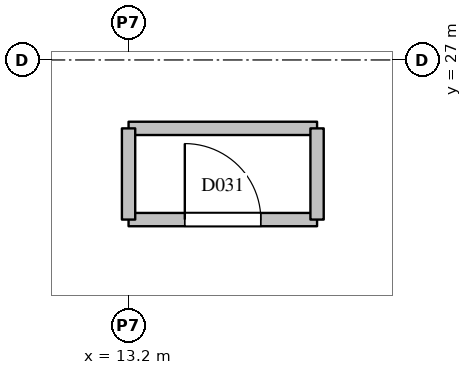
"""IFC4 building model, lengths in metres.
Left out: names, types, materials, properties, quantities, classifications, styles, units other than length and angle.
Written with IfcOpenShell. Run it as: python <this file> out.ifc"""

import sys

from ifc_helpers import new_model, si_unit, direction, frame, frame_2d, origin, place, context, subcontext, project, spatial, rectangle, extrude, element, fill, save


model = new_model("IFC4")
c1 = context("Model", 3, precision=1e-05, world=origin(), true_north=direction((0.0, 1.0)))
c2 = subcontext(c1, "Body", "Model", "MODEL_VIEW")
j1 = project(units=[si_unit("LENGTHUNIT", "METRE"), si_unit("PLANEANGLEUNIT", "RADIAN")], contexts=[c1])
p1 = place(None, origin())
s1 = spatial("IfcSite", under=j1, at=p1, CompositionType="ELEMENT")
p2 = place(p1, origin())
s2 = spatial("IfcBuilding", under=s1, at=p2, CompositionType="ELEMENT")
p3 = place(p2, frame((0.0, 0.0, 38.6)))
s3 = spatial("IfcBuildingStorey", under=s2, at=p3, CompositionType="ELEMENT", Elevation=38.6)
p4 = place(p3, frame((13.2, 24.9, 0.0), z_axis=(0.0, 0.0, 1.0), x_axis=(1.0, 0.0, 0.0)))
e1 = element("IfcWall", 1, at=p4, inside=s3, PredefinedType="PARTITIONING", context=c2, shape_type="SweptSolid", body=[
    extrude(rectangle(XDim=2.48, YDim=0.175, at=frame_2d((1.24, 0.0))), origin(), (0.0, 0.0, 1.0), 3.5),
])
p5 = place(p4, frame((0.74, 0.0, 0.0)))
e2 = element("IfcOpeningElement", 2, at=p5, cuts=e1, PredefinedType="OPENING", context=c2, shape_type="SweptSolid", body=[
    extrude(rectangle(XDim=1.0, YDim=2.1, at=frame_2d((0.5, 1.05))), frame((0.0, 0.097, 0.0), z_axis=(0.0, -1.0, 0.0), x_axis=(1.0, 0.0, 0.0)), (0.0, 0.0, 1.0), 0.195),
])
p6 = place(p3, frame((13.2, 26.1, 0.0), z_axis=(0.0, 0.0, 1.0), x_axis=(1.0, 0.0, 0.0)))
e3 = element("IfcWall", 3, at=p6, inside=s3, PredefinedType="PARTITIONING", context=c2, shape_type="SweptSolid", body=[
    extrude(rectangle(XDim=2.48, YDim=0.175, at=frame_2d((1.24, 0.0))), origin(), (0.0, 0.0, 1.0), 3.5),
])
for number, where, z_axis, x_axis in (
    (4, (13.2, 24.9, 0.0), (0.0, 0.0, 1.0), (0.0, 1.0, 0.0)),
    (5, (15.68, 24.9, 0.0), (0.0, 0.0, 1.0), (0.0, 1.0, 0.0)),
):
    element("IfcWall", number, at=place(p3, frame(where, z_axis=z_axis, x_axis=x_axis)), inside=s3, PredefinedType="PARTITIONING", context=c2, shape_type="SweptSolid", body=[
        extrude(rectangle(XDim=1.2, YDim=0.175, at=frame_2d((0.6, 0.0))), origin(), (0.0, 0.0, 1.0), 3.5),
    ])
p7 = place(p5, origin())
e6 = element("IfcDoor", 6, at=p7, inside=s3, OperationType="SINGLE_SWING_LEFT", PredefinedType="DOOR", context=c2, shape_type="SweptSolid", body=[
    extrude(rectangle(XDim=1.0, YDim=2.1, at=frame_2d((0.5, 1.05))), frame((0.0, 0.025, 0.0), z_axis=(0.0, -1.0, 0.0), x_axis=(1.0, 0.0, 0.0)), (0.0, 0.0, 1.0), 0.05),
])
fill(e2, e6)
save(model, sys.argv[1])
